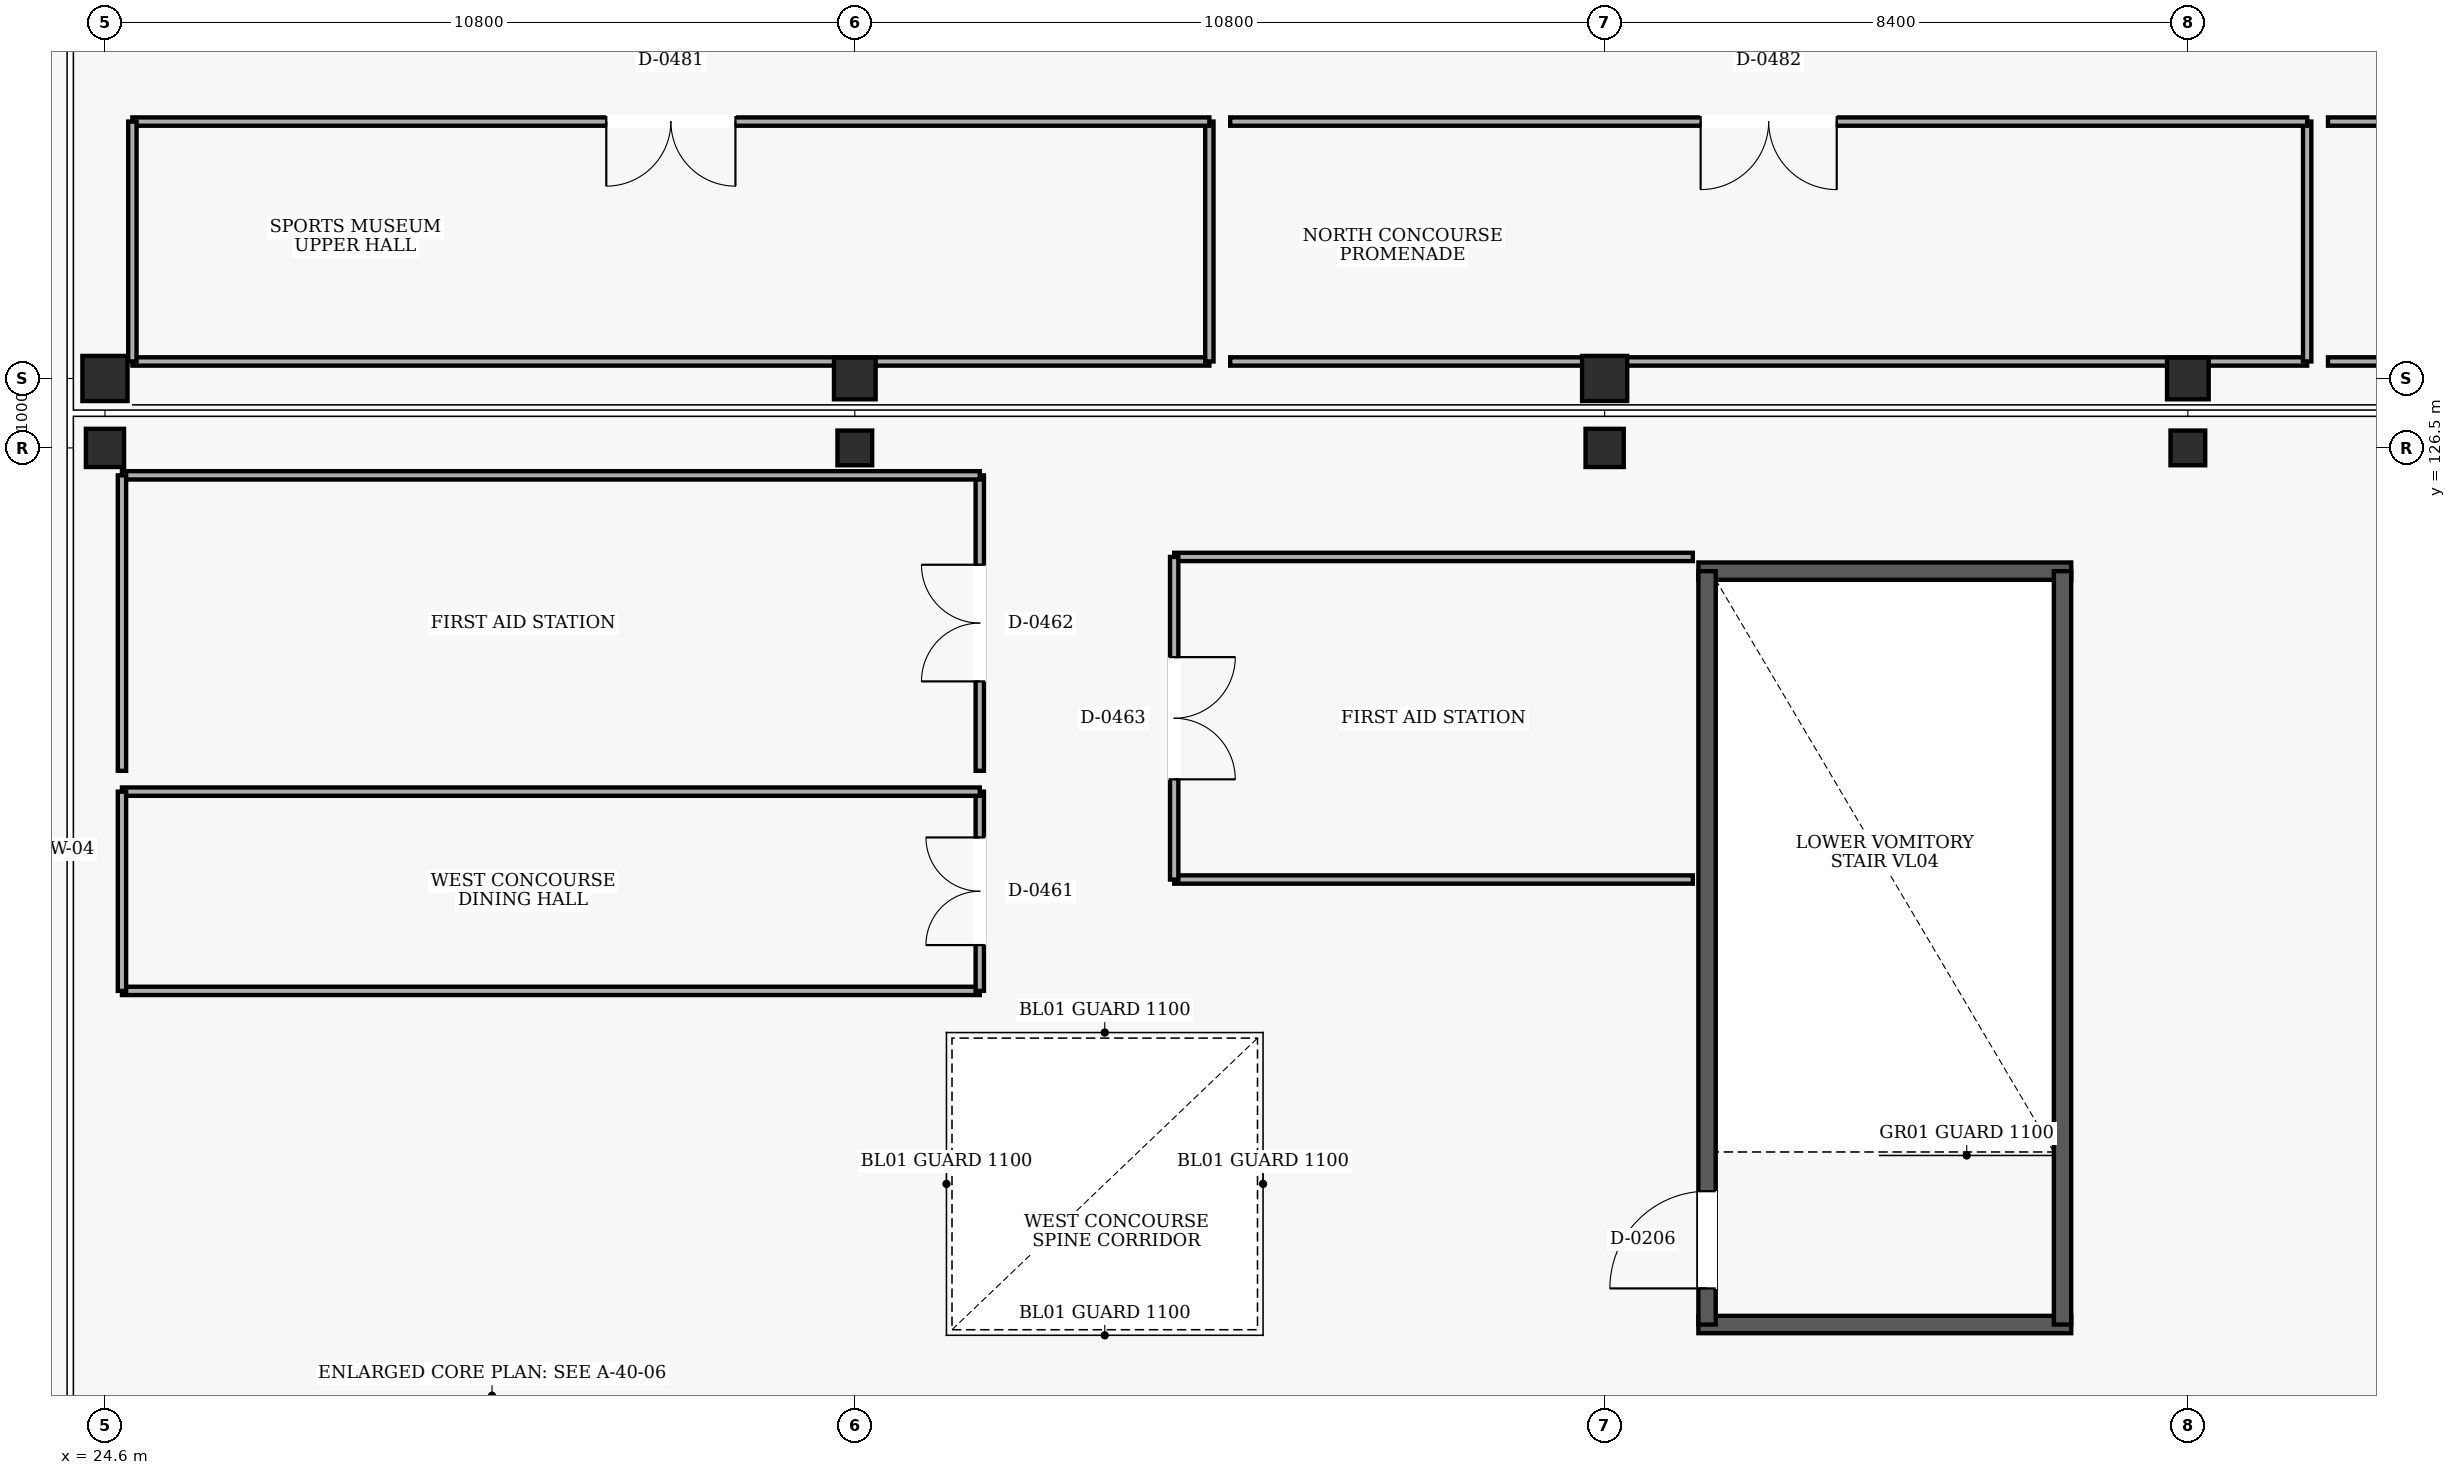
"""IFC4 building model, lengths in metres.
Left out: names, types, materials, properties, quantities, classifications, styles, units other than length and angle.
Written with IfcOpenShell. Run it as: python <this file> out.ifc"""

import sys

from ifc_helpers import new_model, si_unit, direction, frame, frame_2d, origin, origin_2d, place, context, subcontext, project, spatial, rectangle, extrude, element, fill, save


model = new_model("IFC4")
c1 = context("Model", 3, precision=1e-05, world=origin(), true_north=direction((0.0, 1.0)))
c2 = subcontext(c1, "Body", "Model", "MODEL_VIEW")
j1 = project(units=[si_unit("LENGTHUNIT", "METRE"), si_unit("PLANEANGLEUNIT", "RADIAN")], contexts=[c1])
p1 = place(None, origin())
s1 = spatial("IfcSite", under=j1, at=p1, CompositionType="ELEMENT")
p2 = place(p1, origin())
s2 = spatial("IfcBuilding", under=s1, at=p2, CompositionType="ELEMENT")
p3 = place(p2, frame((0.0, 0.0, 5.4)))
s3 = spatial("IfcBuildingStorey", under=s2, at=p3, CompositionType="ELEMENT", Elevation=5.4)
p4 = place(p3, frame((24.6, 126.5, 0.0), z_axis=(0.0, 0.0, 1.0), x_axis=(1.0, 0.0, 0.0)))
e1 = element("IfcColumn", 1, at=p4, inside=s3, PredefinedType="COLUMN", context=c2, shape_type="SweptSolid", body=[
    extrude(rectangle(XDim=0.55, YDim=0.55, at=origin_2d()), origin(), (0.0, 0.0, 1.0), 4.8),
])
p5 = place(p3, frame((24.6, 127.5, 0.0), z_axis=(0.0, 0.0, 1.0), x_axis=(1.0, 0.0, 0.0)))
e2 = element("IfcColumn", 2, at=p5, inside=s3, PredefinedType="COLUMN", context=c2, shape_type="SweptSolid", body=[
    extrude(rectangle(XDim=0.65, YDim=0.65, at=origin_2d()), origin(), (0.0, 0.0, 1.0), 4.8),
])
p6 = place(p3, frame((35.4, 126.5, 0.0), z_axis=(0.0, 0.0, 1.0), x_axis=(1.0, 0.0, 0.0)))
e3 = element("IfcColumn", 3, at=p6, inside=s3, PredefinedType="COLUMN", context=c2, shape_type="SweptSolid", body=[
    extrude(rectangle(XDim=0.5, YDim=0.5, at=origin_2d()), origin(), (0.0, 0.0, 1.0), 4.8),
])
p7 = place(p3, frame((35.4, 127.5, 0.0), z_axis=(0.0, 0.0, 1.0), x_axis=(1.0, 0.0, 0.0)))
e4 = element("IfcColumn", 4, at=p7, inside=s3, PredefinedType="COLUMN", context=c2, shape_type="SweptSolid", body=[
    extrude(rectangle(XDim=0.6, YDim=0.6, at=origin_2d()), origin(), (0.0, 0.0, 1.0), 4.8),
])
p8 = place(p3, frame((46.2, 126.5, 0.0), z_axis=(0.0, 0.0, 1.0), x_axis=(1.0, 0.0, 0.0)))
e5 = element("IfcColumn", 5, at=p8, inside=s3, PredefinedType="COLUMN", context=c2, shape_type="SweptSolid", body=[
    extrude(rectangle(XDim=0.55, YDim=0.55, at=origin_2d()), origin(), (0.0, 0.0, 1.0), 4.8),
])
p9 = place(p3, frame((46.2, 127.5, 0.0), z_axis=(0.0, 0.0, 1.0), x_axis=(1.0, 0.0, 0.0)))
e6 = element("IfcColumn", 6, at=p9, inside=s3, PredefinedType="COLUMN", context=c2, shape_type="SweptSolid", body=[
    extrude(rectangle(XDim=0.65, YDim=0.65, at=origin_2d()), origin(), (0.0, 0.0, 1.0), 4.8),
])
p10 = place(p3, frame((54.6, 126.5, 0.0), z_axis=(0.0, 0.0, 1.0), x_axis=(1.0, 0.0, 0.0)))
e7 = element("IfcColumn", 7, at=p10, inside=s3, PredefinedType="COLUMN", context=c2, shape_type="SweptSolid", body=[
    extrude(rectangle(XDim=0.5, YDim=0.5, at=origin_2d()), origin(), (0.0, 0.0, 1.0), 4.8),
])
p11 = place(p3, frame((54.6, 127.5, 0.0), z_axis=(0.0, 0.0, 1.0), x_axis=(1.0, 0.0, 0.0)))
e8 = element("IfcColumn", 8, at=p11, inside=s3, PredefinedType="COLUMN", context=c2, shape_type="SweptSolid", body=[
    extrude(rectangle(XDim=0.6, YDim=0.6, at=origin_2d()), origin(), (0.0, 0.0, 1.0), 4.8),
])
for number, where, z_axis, x_axis in (
    (9, (47.55, 113.875, 0.0), (0.0, 0.0, 1.0), (1.0, 0.0, 0.0)),
    (10, (52.92, 124.725, 0.0), (0.0, 0.0, 1.0), (-1.0, 0.0, 0.0)),
):
    element("IfcWall", number, at=place(p3, frame(where, z_axis=z_axis, x_axis=x_axis)), inside=s3, PredefinedType="SHEAR", context=c2, shape_type="SweptSolid", body=[
        extrude(rectangle(XDim=5.37, YDim=0.25, at=frame_2d((2.685, 0.0))), origin(), (0.0, 0.0, 1.0), 4.5),
    ])
p12 = place(p3, frame((47.675, 113.875, 0.0), z_axis=(0.0, 0.0, 1.0), x_axis=(0.0, 1.0, 0.0)))
e11 = element("IfcWall", 11, at=p12, inside=s3, PredefinedType="SHEAR", context=c2, shape_type="SweptSolid", body=[
    extrude(rectangle(XDim=10.85, YDim=0.25, at=frame_2d((5.425, 0.0))), origin(), (0.0, 0.0, 1.0), 4.5),
])
p13 = place(p12, frame((0.52, 0.0, 0.0)))
e12 = element("IfcOpeningElement", 12, at=p13, cuts=e11, PredefinedType="OPENING", context=c2, shape_type="SweptSolid", body=[
    extrude(rectangle(XDim=1.4, YDim=2.15, at=frame_2d((0.7, 1.075))), frame((0.0, 0.135, 0.0), z_axis=(0.0, -1.0, 0.0), x_axis=(1.0, 0.0, 0.0)), (0.0, 0.0, 1.0), 0.27),
])
p14 = place(p3, frame((52.795, 113.875, 0.0), z_axis=(0.0, 0.0, 1.0), x_axis=(0.0, 1.0, 0.0)))
e13 = element("IfcWall", 13, at=p14, inside=s3, PredefinedType="SHEAR", context=c2, shape_type="SweptSolid", body=[
    extrude(rectangle(XDim=10.85, YDim=0.25, at=frame_2d((5.425, 0.0))), origin(), (0.0, 0.0, 1.0), 4.5),
])
p15 = place(p3, frame((24.845, 118.68, 0.0), z_axis=(0.0, 0.0, 1.0), x_axis=(1.0, 0.0, 0.0)))
e14 = element("IfcWall", 14, at=p15, inside=s3, PredefinedType="PARTITIONING", context=c2, shape_type="SweptSolid", body=[
    extrude(rectangle(XDim=12.355, YDim=0.12, at=frame_2d((6.177, 0.0))), origin(), (0.0, 0.0, 1.0), 4.5),
])
p16 = place(p3, frame((37.2, 118.68, 0.0), z_axis=(0.0, 0.0, 1.0), x_axis=(0.0, 1.0, 0.0)))
e15 = element("IfcWall", 15, at=p16, inside=s3, PredefinedType="PARTITIONING", context=c2, shape_type="SweptSolid", body=[
    extrude(rectangle(XDim=2.87, YDim=0.12, at=frame_2d((1.435, 0.0))), origin(), (0.0, 0.0, 1.0), 4.5),
])
p17 = place(p16, frame((0.66, 0.0, 0.0)))
e16 = element("IfcOpeningElement", 16, at=p17, cuts=e15, PredefinedType="OPENING", context=c2, shape_type="SweptSolid", body=[
    extrude(rectangle(XDim=1.55, YDim=2.2, at=frame_2d((0.775, 1.1))), frame((0.0, 0.07, 0.0), z_axis=(0.0, -1.0, 0.0), x_axis=(1.0, 0.0, 0.0)), (0.0, 0.0, 1.0), 0.14),
])
p18 = place(p3, frame((37.2, 121.55, 0.0), z_axis=(0.0, 0.0, 1.0), x_axis=(-1.0, 0.0, 0.0)))
e17 = element("IfcWall", 17, at=p18, inside=s3, PredefinedType="PARTITIONING", context=c2, shape_type="SweptSolid", body=[
    extrude(rectangle(XDim=12.355, YDim=0.12, at=frame_2d((6.177, 0.0))), origin(), (0.0, 0.0, 1.0), 4.5),
])
p19 = place(p3, frame((24.845, 121.55, 0.0), z_axis=(0.0, 0.0, 1.0), x_axis=(0.0, -1.0, 0.0)))
e18 = element("IfcWall", 18, at=p19, inside=s3, PredefinedType="PARTITIONING", context=c2, shape_type="SweptSolid", body=[
    extrude(rectangle(XDim=2.87, YDim=0.12, at=frame_2d((1.435, 0.0))), origin(), (0.0, 0.0, 1.0), 3.58),
])
p20 = place(p3, frame((37.2, 121.85, 0.0), z_axis=(0.0, 0.0, 1.0), x_axis=(0.0, 1.0, 0.0)))
e19 = element("IfcWall", 19, at=p20, inside=s3, PredefinedType="PARTITIONING", context=c2, shape_type="SweptSolid", body=[
    extrude(rectangle(XDim=4.255, YDim=0.12, at=frame_2d((2.127, 0.0))), origin(), (0.0, 0.0, 1.0), 4.5),
])
p21 = place(p20, frame((1.288, 0.0, 0.0)))
e20 = element("IfcOpeningElement", 20, at=p21, cuts=e19, PredefinedType="OPENING", context=c2, shape_type="SweptSolid", body=[
    extrude(rectangle(XDim=1.68, YDim=2.25, at=frame_2d((0.84, 1.125))), frame((0.0, 0.07, 0.0), z_axis=(0.0, -1.0, 0.0), x_axis=(1.0, 0.0, 0.0)), (0.0, 0.0, 1.0), 0.14),
])
p22 = place(p3, frame((37.2, 126.105, 0.0), z_axis=(0.0, 0.0, 1.0), x_axis=(-1.0, 0.0, 0.0)))
e21 = element("IfcWall", 21, at=p22, inside=s3, PredefinedType="PARTITIONING", context=c2, shape_type="SweptSolid", body=[
    extrude(rectangle(XDim=12.355, YDim=0.12, at=frame_2d((6.177, 0.0))), origin(), (0.0, 0.0, 1.0), 3.58),
])
p23 = place(p3, frame((24.845, 126.105, 0.0), z_axis=(0.0, 0.0, 1.0), x_axis=(0.0, -1.0, 0.0)))
e22 = element("IfcWall", 22, at=p23, inside=s3, PredefinedType="PARTITIONING", context=c2, shape_type="SweptSolid", body=[
    extrude(rectangle(XDim=4.255, YDim=0.12, at=frame_2d((2.127, 0.0))), origin(), (0.0, 0.0, 1.0), 3.58),
])
for number, where, z_axis, x_axis in (
    (23, (40.0, 120.284, 0.0), (0.0, 0.0, 1.0), (1.0, 0.0, 0.0)),
    (24, (47.47, 124.93, 0.0), (0.0, 0.0, 1.0), (-1.0, 0.0, 0.0)),
):
    element("IfcWall", number, at=place(p3, frame(where, z_axis=z_axis, x_axis=x_axis)), inside=s3, PredefinedType="PARTITIONING", context=c2, shape_type="SweptSolid", body=[
        extrude(rectangle(XDim=7.47, YDim=0.12, at=frame_2d((3.735, 0.0))), origin(), (0.0, 0.0, 1.0), 4.5),
    ])
p24 = place(p3, frame((40.0, 124.93, 0.0), z_axis=(0.0, 0.0, 1.0), x_axis=(0.0, -1.0, 0.0)))
e25 = element("IfcWall", 25, at=p24, inside=s3, PredefinedType="PARTITIONING", context=c2, shape_type="SweptSolid", body=[
    extrude(rectangle(XDim=4.646, YDim=0.12, at=frame_2d((2.323, 0.0))), origin(), (0.0, 0.0, 1.0), 4.5),
])
p25 = place(p24, frame((1.443, 0.0, 0.0)))
e26 = element("IfcOpeningElement", 26, at=p25, cuts=e25, PredefinedType="OPENING", context=c2, shape_type="SweptSolid", body=[
    extrude(rectangle(XDim=1.76, YDim=2.25, at=frame_2d((0.88, 1.125))), frame((0.0, 0.07, 0.0), z_axis=(0.0, -1.0, 0.0), x_axis=(1.0, 0.0, 0.0)), (0.0, 0.0, 1.0), 0.14),
])
p26 = place(p3, frame((24.995, 127.745, 0.0), z_axis=(0.0, 0.0, 1.0), x_axis=(1.0, 0.0, 0.0)))
e27 = element("IfcWall", 27, at=p26, inside=s3, PredefinedType="PARTITIONING", context=c2, shape_type="SweptSolid", body=[
    extrude(rectangle(XDim=15.511, YDim=0.12, at=frame_2d((7.756, 0.0))), origin(), (0.0, 0.0, 1.0), 3.58),
])
p27 = place(p3, frame((40.507, 127.745, 0.0), z_axis=(0.0, 0.0, 1.0), x_axis=(0.0, 1.0, 0.0)))
e28 = element("IfcWall", 28, at=p27, inside=s3, PredefinedType="PARTITIONING", context=c2, shape_type="SweptSolid", body=[
    extrude(rectangle(XDim=3.455, YDim=0.12, at=frame_2d((1.728, 0.0))), origin(), (0.0, 0.0, 1.0), 4.5),
])
p28 = place(p3, frame((40.507, 131.2, 0.0), z_axis=(0.0, 0.0, 1.0), x_axis=(-1.0, 0.0, 0.0)))
e29 = element("IfcWall", 29, at=p28, inside=s3, PredefinedType="PARTITIONING", context=c2, shape_type="SweptSolid", body=[
    extrude(rectangle(XDim=15.511, YDim=0.12, at=frame_2d((7.756, 0.0))), origin(), (0.0, 0.0, 1.0), 4.5),
])
p29 = place(p28, frame((6.826, 0.0, 0.0)))
e30 = element("IfcOpeningElement", 30, at=p29, cuts=e29, PredefinedType="OPENING", context=c2, shape_type="SweptSolid", body=[
    extrude(rectangle(XDim=1.86, YDim=2.3, at=frame_2d((0.93, 1.15))), frame((0.0, 0.07, 0.0), z_axis=(0.0, -1.0, 0.0), x_axis=(1.0, 0.0, 0.0)), (0.0, 0.0, 1.0), 0.14),
])
p30 = place(p3, frame((24.995, 131.2, 0.0), z_axis=(0.0, 0.0, 1.0), x_axis=(0.0, -1.0, 0.0)))
e31 = element("IfcWall", 31, at=p30, inside=s3, PredefinedType="PARTITIONING", context=c2, shape_type="SweptSolid", body=[
    extrude(rectangle(XDim=3.455, YDim=0.12, at=frame_2d((1.728, 0.0))), origin(), (0.0, 0.0, 1.0), 3.88),
])
p31 = place(p3, frame((40.807, 127.745, 0.0), z_axis=(0.0, 0.0, 1.0), x_axis=(1.0, 0.0, 0.0)))
e32 = element("IfcWall", 32, at=p31, inside=s3, PredefinedType="PARTITIONING", context=c2, shape_type="SweptSolid", body=[
    extrude(rectangle(XDim=15.512, YDim=0.12, at=frame_2d((7.756, 0.0))), origin(), (0.0, 0.0, 1.0), 3.58),
])
p32 = place(p3, frame((56.318, 127.745, 0.0), z_axis=(0.0, 0.0, 1.0), x_axis=(0.0, 1.0, 0.0)))
e33 = element("IfcWall", 33, at=p32, inside=s3, PredefinedType="PARTITIONING", context=c2, shape_type="SweptSolid", body=[
    extrude(rectangle(XDim=3.455, YDim=0.12, at=frame_2d((1.728, 0.0))), origin(), (0.0, 0.0, 1.0), 4.5),
])
p33 = place(p3, frame((56.318, 131.2, 0.0), z_axis=(0.0, 0.0, 1.0), x_axis=(-1.0, 0.0, 0.0)))
e34 = element("IfcWall", 34, at=p33, inside=s3, PredefinedType="PARTITIONING", context=c2, shape_type="SweptSolid", body=[
    extrude(rectangle(XDim=15.512, YDim=0.12, at=frame_2d((7.756, 0.0))), origin(), (0.0, 0.0, 1.0), 4.5),
])
p34 = place(p33, frame((6.776, 0.0, 0.0)))
e35 = element("IfcOpeningElement", 35, at=p34, cuts=e34, PredefinedType="OPENING", context=c2, shape_type="SweptSolid", body=[
    extrude(rectangle(XDim=1.96, YDim=2.3, at=frame_2d((0.98, 1.15))), frame((0.0, 0.07, 0.0), z_axis=(0.0, -1.0, 0.0), x_axis=(1.0, 0.0, 0.0)), (0.0, 0.0, 1.0), 0.14),
])
p35 = place(p3, frame((56.618, 127.745, 0.0), z_axis=(0.0, 0.0, 1.0), x_axis=(1.0, 0.0, 0.0)))
e36 = element("IfcWall", 36, at=p35, inside=s3, PredefinedType="PARTITIONING", context=c2, shape_type="SweptSolid", body=[
    extrude(rectangle(XDim=15.511, YDim=0.12, at=frame_2d((7.756, 0.0))), origin(), (0.0, 0.0, 1.0), 3.63),
])
p36 = place(p3, frame((72.13, 131.2, 0.0), z_axis=(0.0, 0.0, 1.0), x_axis=(-1.0, 0.0, 0.0)))
e37 = element("IfcWall", 37, at=p36, inside=s3, PredefinedType="PARTITIONING", context=c2, shape_type="SweptSolid", body=[
    extrude(rectangle(XDim=15.511, YDim=0.12, at=frame_2d((7.756, 0.0))), origin(), (0.0, 0.0, 1.0), 4.5),
])
p37 = place(p36, frame((6.716, 0.0, 0.0)))
e38 = element("IfcOpeningElement", 38, at=p37, cuts=e37, PredefinedType="OPENING", context=c2, shape_type="SweptSolid", body=[
    extrude(rectangle(XDim=2.08, YDim=2.35, at=frame_2d((1.04, 1.175))), frame((0.0, 0.07, 0.0), z_axis=(0.0, -1.0, 0.0), x_axis=(1.0, 0.0, 0.0)), (0.0, 0.0, 1.0), 0.14),
])
p38 = place(p13, frame((1.4, 0.0, 0.0), z_axis=(0.0, 0.0, 1.0), x_axis=(-1.0, 0.0, 0.0)))
e39 = element("IfcDoor", 39, at=p38, inside=s3, OperationType="SINGLE_SWING_RIGHT", PredefinedType="DOOR", context=c2, shape_type="SweptSolid", body=[
    extrude(rectangle(XDim=1.4, YDim=2.15, at=frame_2d((0.7, 1.075))), frame((0.0, 0.025, 0.0), z_axis=(0.0, -1.0, 0.0), x_axis=(1.0, 0.0, 0.0)), (0.0, 0.0, 1.0), 0.05),
])
fill(e12, e39)
p39 = place(p17, origin())
e40 = element("IfcDoor", 40, at=p39, inside=s3, OperationType="DOUBLE_DOOR_SINGLE_SWING", PredefinedType="DOOR", context=c2, shape_type="SweptSolid", body=[
    extrude(rectangle(XDim=1.55, YDim=2.2, at=frame_2d((0.775, 1.1))), frame((0.0, 0.025, 0.0), z_axis=(0.0, -1.0, 0.0), x_axis=(1.0, 0.0, 0.0)), (0.0, 0.0, 1.0), 0.05),
])
fill(e16, e40)
p40 = place(p21, origin())
e41 = element("IfcDoor", 41, at=p40, inside=s3, OperationType="DOUBLE_DOOR_SINGLE_SWING", PredefinedType="DOOR", context=c2, shape_type="SweptSolid", body=[
    extrude(rectangle(XDim=1.68, YDim=2.25, at=frame_2d((0.84, 1.125))), frame((0.0, 0.025, 0.0), z_axis=(0.0, -1.0, 0.0), x_axis=(1.0, 0.0, 0.0)), (0.0, 0.0, 1.0), 0.05),
])
fill(e20, e41)
p41 = place(p25, origin())
e42 = element("IfcDoor", 42, at=p41, inside=s3, OperationType="DOUBLE_DOOR_SINGLE_SWING", PredefinedType="DOOR", context=c2, shape_type="SweptSolid", body=[
    extrude(rectangle(XDim=1.76, YDim=2.25, at=frame_2d((0.88, 1.125))), frame((0.0, 0.025, 0.0), z_axis=(0.0, -1.0, 0.0), x_axis=(1.0, 0.0, 0.0)), (0.0, 0.0, 1.0), 0.05),
])
fill(e26, e42)
p42 = place(p29, origin())
e43 = element("IfcDoor", 43, at=p42, inside=s3, OperationType="DOUBLE_DOOR_SINGLE_SWING", PredefinedType="DOOR", context=c2, shape_type="SweptSolid", body=[
    extrude(rectangle(XDim=1.86, YDim=2.3, at=frame_2d((0.93, 1.15))), frame((0.0, 0.025, 0.0), z_axis=(0.0, -1.0, 0.0), x_axis=(1.0, 0.0, 0.0)), (0.0, 0.0, 1.0), 0.05),
])
fill(e30, e43)
p43 = place(p34, origin())
e44 = element("IfcDoor", 44, at=p43, inside=s3, OperationType="DOUBLE_DOOR_SINGLE_SWING", PredefinedType="DOOR", context=c2, shape_type="SweptSolid", body=[
    extrude(rectangle(XDim=1.96, YDim=2.3, at=frame_2d((0.98, 1.15))), frame((0.0, 0.025, 0.0), z_axis=(0.0, -1.0, 0.0), x_axis=(1.0, 0.0, 0.0)), (0.0, 0.0, 1.0), 0.05),
])
fill(e35, e44)
save(model, sys.argv[1])
